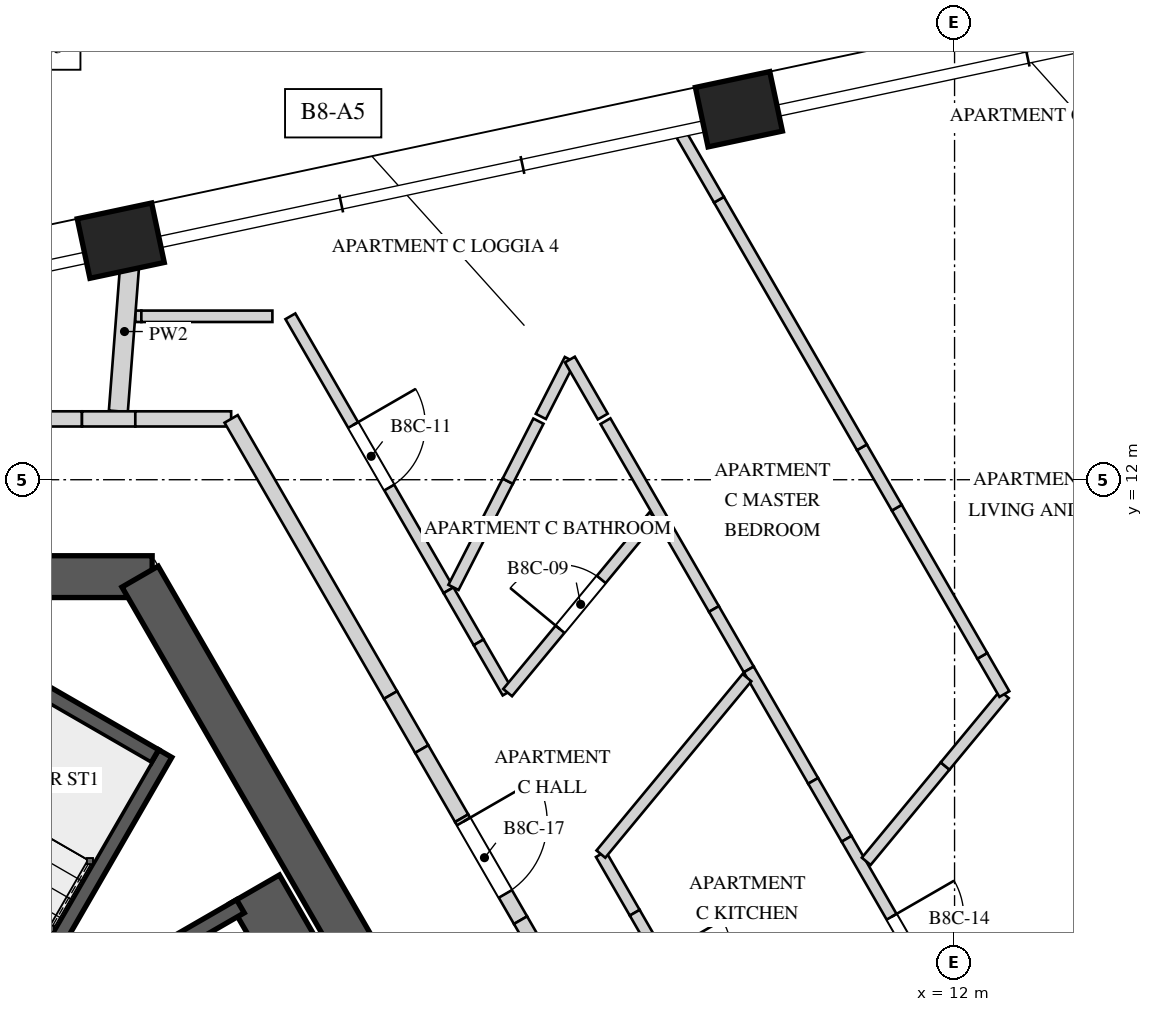
"""IFC4 building model, lengths in metres.
Left out: names, types, materials, properties, quantities, classifications, styles, units other than length and angle.
Written with IfcOpenShell. Run it as: python <this file> out.ifc"""

import sys

from ifc_helpers import new_model, si_unit, direction, frame, frame_2d, origin, origin_2d, place, context, subcontext, project, spatial, polyline, rectangle, outline, extrude, element, fill, save


model = new_model("IFC4")
c1 = context("Model", 3, precision=1e-05, world=origin(), true_north=direction((0.0, 1.0)))
c2 = subcontext(c1, "Body", "Model", "MODEL_VIEW")
j1 = project(units=[si_unit("LENGTHUNIT", "METRE"), si_unit("PLANEANGLEUNIT", "RADIAN")], contexts=[c1])
p1 = place(None, origin())
s1 = spatial("IfcSite", under=j1, at=p1, CompositionType="ELEMENT")
p2 = place(p1, origin())
s2 = spatial("IfcBuilding", under=s1, at=p2, CompositionType="ELEMENT")
p3 = place(p2, frame((0.0, 0.0, 348.4)))
s3 = spatial("IfcBuildingStorey", under=s2, at=p3, CompositionType="ELEMENT", Elevation=348.4)
p4 = place(p3, frame((1.443, 10.725, 0.0), z_axis=(0.0, 0.0, 1.0), x_axis=(-1.0, 0.0, 0.0)))
e1 = element("IfcWall", 1, at=p4, inside=s3, PredefinedType="SHEAR", context=c2, shape_type="SweptSolid", body=[
    extrude(rectangle(XDim=2.887, YDim=0.55, at=frame_2d((1.443, 0.0))), origin(), (0.0, 0.0, 1.0), 4.0),
])
p5 = place(p3, frame((9.93, -4.25, 0.0), z_axis=(0.0, 0.0, 1.0), x_axis=(-0.499994590896, 0.86602852671, 0.0)))
e2 = element("IfcWall", 2, at=p5, inside=s3, PredefinedType="SHEAR", context=c2, shape_type="SweptSolid", body=[
    extrude(rectangle(XDim=17.292, YDim=0.55, at=frame_2d((8.646, 0.0))), origin(), (0.0, 0.0, 1.0), 4.0),
])
p6 = place(p5, frame((6.921, 0.0, 0.0)))
e3 = element("IfcOpeningElement", 3, at=p6, cuts=e2, PredefinedType="OPENING", context=c2, shape_type="SweptSolid", body=[
    extrude(rectangle(XDim=1.0, YDim=2.4, at=frame_2d((0.5, 1.2))), frame((0.0, 0.285, 0.0), z_axis=(0.0, -1.0, 0.0), x_axis=(1.0, 0.0, 0.0)), (0.0, 0.0, 1.0), 0.57),
])
for number, where, z_axis, x_axis in (
    (4, (9.163, 16.874, 0.0), (0.0, 0.0, 1.0), (-0.978, -0.208, 0.0)),
    (5, (1.031, 15.145, 0.0), (0.0, 0.0, 1.0), (-0.978, -0.208, 0.0)),
):
    element("IfcColumn", number, at=place(p3, frame(where, z_axis=z_axis, x_axis=x_axis)), inside=s3, PredefinedType="COLUMN", context=c2, shape_type="SweptSolid", body=[
        extrude(rectangle(XDim=1.0, YDim=0.8, at=origin_2d()), origin(), (0.0, 0.0, 1.0), 4.0),
    ])
p7 = place(p3, frame((1.615, 8.397, 0.0), z_axis=(0.0, 0.0, 1.0), x_axis=(-0.500009909098, -0.866019682689, 0.0)))
e6 = element("IfcWall", 6, at=p7, inside=s3, PredefinedType="SOLIDWALL", context=c2, shape_type="SweptSolid", body=[
    extrude(rectangle(XDim=6.2, YDim=0.2, at=frame_2d((3.1, 0.0))), origin(), (0.0, 0.0, 1.0), 3.65),
])
p8 = place(p3, frame((1.479, 8.361, 0.0), z_axis=(0.0, 0.0, 1.0), x_axis=(-0.865989465428, 0.500062241894, 0.0)))
e7 = element("IfcWall", 7, at=p8, inside=s3, PredefinedType="SOLIDWALL", context=c2, shape_type="SweptSolid", body=[
    extrude(rectangle(XDim=2.55, YDim=0.2, at=frame_2d((1.275, 0.0))), origin(), (0.0, 0.0, 1.0), 3.65),
])
p9 = place(p3, frame((5.243, 2.369, 0.0), z_axis=(0.0, 0.0, 1.0), x_axis=(-0.500002801628, 0.866023786258, 0.0)))
e8 = element("IfcWall", 8, at=p9, inside=s3, PredefinedType="SOLIDWALL", context=c2, shape_type="SweptSolid", body=[
    extrude(rectangle(XDim=4.9, YDim=0.75, at=frame_2d((2.45, 0.0))), origin(), (0.0, 0.0, 1.0), 3.65),
])
p10 = place(p3, frame((-0.123, 4.813, 0.0), z_axis=(0.0, 0.0, 1.0), x_axis=(0.866016494683, 0.500015430699, 0.0)))
e9 = element("IfcWall", 9, at=p10, inside=s3, PredefinedType="SOLIDWALL", context=c2, shape_type="SweptSolid", body=[
    extrude(rectangle(XDim=3.15, YDim=0.2, at=frame_2d((1.575, 0.0))), origin(), (0.0, 0.0, 1.0), 3.65),
])
p11 = place(p3, frame((1.221, 14.15, 0.0), z_axis=(0.0, 0.0, 1.0), x_axis=(1.0, 0.0, 0.0)))
e10 = element("IfcWall", 10, at=p11, inside=s3, PredefinedType="PARTITIONING", context=c2, shape_type="SweptSolid", body=[
    extrude(rectangle(XDim=0.08, YDim=0.15, at=frame_2d((0.04, 0.0))), origin(), (0.0, 0.0, 1.0), 2.95),
])
p12 = place(p3, frame((1.301, 14.15, 0.0), z_axis=(0.0, 0.0, 1.0), x_axis=(1.0, 0.0, 0.0)))
e11 = element("IfcWall", 11, at=p12, inside=s3, PredefinedType="PARTITIONING", context=c2, shape_type="SweptSolid", body=[
    extrude(rectangle(XDim=1.724, YDim=0.15, at=frame_2d((0.862, 0.0))), origin(), (0.0, 0.0, 1.0), 3.65),
])
p13 = place(p3, frame((1.161, 14.999, 0.0), z_axis=(0.0, 0.0, 1.0), x_axis=(-0.077237463648, -0.997012725199, 0.0)))
e12 = element("IfcWall", 12, at=p13, inside=s3, PredefinedType="SOLIDWALL", context=c2, shape_type="SweptSolid", body=[
    extrude(rectangle(XDim=2.105, YDim=0.25, at=frame_2d((1.053, 0.0))), origin(), (0.0, 0.0, 1.0), 2.95),
])
p14 = place(p3, frame((3.262, 14.15, 0.0), z_axis=(0.0, 0.0, 1.0), x_axis=(0.500032238466, -0.866006790097, 0.0)))
e13 = element("IfcWall", 13, at=p14, inside=s3, PredefinedType="PARTITIONING", context=c2, shape_type="SweptSolid", body=[
    extrude(rectangle(XDim=4.161, YDim=0.15, at=frame_2d((2.081, 0.0))), origin(), (0.0, 0.0, 1.0), 3.65),
])
p15 = place(p14, frame((1.652, 0.0, 0.0)))
e14 = element("IfcOpeningElement", 14, at=p15, cuts=e13, PredefinedType="OPENING", context=c2, shape_type="SweptSolid", body=[
    extrude(rectangle(XDim=0.95, YDim=2.4, at=frame_2d((0.475, 1.2))), frame((0.0, 0.085, 0.0), z_axis=(0.0, -1.0, 0.0), x_axis=(1.0, 0.0, 0.0)), (0.0, 0.0, 1.0), 0.17),
])
p16 = place(p3, frame((5.343, 10.546, 0.0), z_axis=(0.0, 0.0, 1.0), x_axis=(0.499953838557, -0.866052053466, 0.0)))
e15 = element("IfcWall", 15, at=p16, inside=s3, PredefinedType="PARTITIONING", context=c2, shape_type="SweptSolid", body=[
    extrude(rectangle(XDim=0.792, YDim=0.15, at=frame_2d((0.396, 0.0))), origin(), (0.0, 0.0, 1.0), 2.95),
])
p17 = place(p3, frame((5.739, 9.861, 0.0), z_axis=(0.0, 0.0, 1.0), x_axis=(0.499888569412, -0.866089728707, 0.0)))
e16 = element("IfcWall", 16, at=p17, inside=s3, PredefinedType="PARTITIONING", context=c2, shape_type="SweptSolid", body=[
    extrude(rectangle(XDim=0.763, YDim=0.15, at=frame_2d((0.382, 0.0))), origin(), (0.0, 0.0, 1.0), 3.65),
])
p18 = place(p3, frame((5.408, 10.583, 0.0), z_axis=(0.0, 0.0, 1.0), x_axis=(0.455037050625, 0.890472505223, 0.0)))
e17 = element("IfcWall", 17, at=p18, inside=s3, PredefinedType="PARTITIONING", context=c2, shape_type="SweptSolid", body=[
    extrude(rectangle(XDim=1.569, YDim=0.15, at=frame_2d((0.785, 0.0))), origin(), (0.0, 0.0, 1.0), 2.95),
])
p19 = place(p3, frame((6.122, 11.981, 0.0), z_axis=(0.0, 0.0, 1.0), x_axis=(0.454907271536, 0.890538811228, 0.0)))
e18 = element("IfcWall", 18, at=p19, inside=s3, PredefinedType="PARTITIONING", context=c2, shape_type="SweptSolid", body=[
    extrude(rectangle(XDim=0.887, YDim=0.15, at=frame_2d((0.443, 0.0))), origin(), (0.0, 0.0, 1.0), 3.65),
])
p20 = place(p3, frame((6.12, 9.199, 0.0), z_axis=(0.0, 0.0, 1.0), x_axis=(0.63755942525, 0.770401180733, 0.0)))
e19 = element("IfcWall", 19, at=p20, inside=s3, PredefinedType="PARTITIONING", context=c2, shape_type="SweptSolid", body=[
    extrude(rectangle(XDim=3.014, YDim=0.15, at=frame_2d((1.507, 0.0))), origin(), (0.0, 0.0, 1.0), 3.65),
])
p21 = place(p20, frame((1.082, 0.0, 0.0)))
e20 = element("IfcOpeningElement", 20, at=p21, cuts=e19, PredefinedType="OPENING", context=c2, shape_type="SweptSolid", body=[
    extrude(rectangle(XDim=0.85, YDim=2.4, at=frame_2d((0.425, 1.2))), frame((0.0, 0.085, 0.0), z_axis=(0.0, -1.0, 0.0), x_axis=(1.0, 0.0, 0.0)), (0.0, 0.0, 1.0), 0.17),
])
p22 = place(p3, frame((6.557, 12.833, 0.0), z_axis=(0.0, 0.0, 1.0), x_axis=(0.454870350547, 0.890557670336, 0.0)))
e21 = element("IfcWall", 21, at=p22, inside=s3, PredefinedType="PARTITIONING", context=c2, shape_type="SweptSolid", body=[
    extrude(rectangle(XDim=0.84, YDim=0.15, at=frame_2d((0.42, 0.0))), origin(), (0.0, 0.0, 1.0), 3.65),
])
p23 = place(p3, frame((6.939, 13.581, 0.0), z_axis=(0.0, 0.0, 1.0), x_axis=(0.499990973765, -0.866030615021, 0.0)))
e22 = element("IfcWall", 22, at=p23, inside=s3, PredefinedType="PARTITIONING", context=c2, shape_type="SweptSolid", body=[
    extrude(rectangle(XDim=0.866, YDim=0.15, at=frame_2d((0.433, 0.0))), origin(), (0.0, 0.0, 1.0), 2.95),
])
p24 = place(p3, frame((7.347, 7.074, 0.0), z_axis=(0.0, 0.0, 1.0), x_axis=(0.499944022619, -0.866057719929, 0.0)))
e23 = element("IfcWall", 23, at=p24, inside=s3, PredefinedType="PARTITIONING", context=c2, shape_type="SweptSolid", body=[
    extrude(rectangle(XDim=0.89, YDim=0.15, at=frame_2d((0.445, 0.0))), origin(), (0.0, 0.0, 1.0), 3.65),
])
p25 = place(p3, frame((7.792, 6.303, 0.0), z_axis=(0.0, 0.0, 1.0), x_axis=(0.500027802648, -0.866009351323, 0.0)))
e24 = element("IfcWall", 24, at=p25, inside=s3, PredefinedType="PARTITIONING", context=c2, shape_type="SweptSolid", body=[
    extrude(outline(polyline([(0.0, 0.0), (1.661, 0.0), (1.661, 3.65), (0.881, 3.65), (0.881, 2.55), (0.0, 2.55), (0.0, 0.0)])), frame((0.0, 0.075, 0.0), z_axis=(0.0, -1.0, 0.0), x_axis=(1.0, 0.0, 0.0)), (0.0, 0.0, 1.0), 0.15),
])
p26 = place(p25, frame((0.661, 0.0, 0.0)))
e25 = element("IfcOpeningElement", 25, at=p26, cuts=e24, PredefinedType="OPENING", context=c2, shape_type="SweptSolid", body=[
    extrude(rectangle(XDim=0.95, YDim=2.4, at=frame_2d((0.475, 1.2))), frame((0.0, 0.085, 0.0), z_axis=(0.0, -1.0, 0.0), x_axis=(1.0, 0.0, 0.0)), (0.0, 0.0, 1.0), 0.17),
])
p27 = place(p3, frame((7.407, 12.771, 0.0), z_axis=(0.0, 0.0, 1.0), x_axis=(0.499966841219, -0.866044547169, 0.0)))
e26 = element("IfcWall", 26, at=p27, inside=s3, PredefinedType="PARTITIONING", context=c2, shape_type="SweptSolid", body=[
    extrude(rectangle(XDim=2.854, YDim=0.15, at=frame_2d((1.427, 0.0))), origin(), (0.0, 0.0, 1.0), 3.65),
])
p28 = place(p3, frame((8.834, 10.299, 0.0), z_axis=(0.0, 0.0, 1.0), x_axis=(0.499945096919, -0.866057099772, 0.0)))
e27 = element("IfcWall", 27, at=p28, inside=s3, PredefinedType="PARTITIONING", context=c2, shape_type="SweptSolid", body=[
    extrude(rectangle(XDim=0.917, YDim=0.15, at=frame_2d((0.459, 0.0))), origin(), (0.0, 0.0, 1.0), 2.55),
])
p29 = place(p3, frame((9.293, 9.504, 0.0), z_axis=(0.0, 0.0, 1.0), x_axis=(0.500046963369, -0.865998287773, 0.0)))
e28 = element("IfcWall", 28, at=p29, inside=s3, PredefinedType="PARTITIONING", context=c2, shape_type="SweptSolid", body=[
    extrude(rectangle(XDim=1.693, YDim=0.15, at=frame_2d((0.847, 0.0))), origin(), (0.0, 0.0, 1.0), 3.65),
])
p30 = place(p3, frame((10.139, 8.038, 0.0), z_axis=(0.0, 0.0, 1.0), x_axis=(0.499866452165, -0.866102493935, 0.0)))
e29 = element("IfcWall", 29, at=p30, inside=s3, PredefinedType="PARTITIONING", context=c2, shape_type="SweptSolid", body=[
    extrude(rectangle(XDim=0.881, YDim=0.15, at=frame_2d((0.44, 0.0))), origin(), (0.0, 0.0, 1.0), 2.55),
])
p31 = place(p3, frame((10.58, 7.275, 0.0), z_axis=(0.0, 0.0, 1.0), x_axis=(0.500012835235, -0.866017993231, 0.0)))
e30 = element("IfcWall", 30, at=p31, inside=s3, PredefinedType="PARTITIONING", context=c2, shape_type="SweptSolid", body=[
    extrude(rectangle(XDim=2.305, YDim=0.15, at=frame_2d((1.152, 0.0))), origin(), (0.0, 0.0, 1.0), 3.65),
])
p32 = place(p31, frame((1.184, 0.0, 0.0)))
e31 = element("IfcOpeningElement", 31, at=p32, cuts=e30, PredefinedType="OPENING", context=c2, shape_type="SweptSolid", body=[
    extrude(rectangle(XDim=0.95, YDim=2.4, at=frame_2d((0.475, 1.2))), frame((0.0, 0.085, 0.0), z_axis=(0.0, -1.0, 0.0), x_axis=(1.0, 0.0, 0.0)), (0.0, 0.0, 1.0), 0.17),
])
p33 = place(p3, frame((9.269, 9.396, 0.0), z_axis=(0.0, 0.0, 1.0), x_axis=(-0.637511345934, -0.770440967113, 0.0)))
e32 = element("IfcWall", 32, at=p33, inside=s3, PredefinedType="PARTITIONING", context=c2, shape_type="SweptSolid", body=[
    extrude(rectangle(XDim=3.014, YDim=0.15, at=frame_2d((1.507, 0.0))), origin(), (0.0, 0.0, 1.0), 3.65),
])
p34 = place(p3, frame((10.838, 6.98, 0.0), z_axis=(0.0, 0.0, 1.0), x_axis=(0.637509370169, 0.770442601981, 0.0)))
e33 = element("IfcWall", 33, at=p34, inside=s3, PredefinedType="PARTITIONING", context=c2, shape_type="SweptSolid", body=[
    extrude(rectangle(XDim=1.627, YDim=0.15, at=frame_2d((0.813, 0.0))), origin(), (0.0, 0.0, 1.0), 3.65),
])
p35 = place(p3, frame((11.875, 8.233, 0.0), z_axis=(0.0, 0.0, 1.0), x_axis=(0.637588147155, 0.770377410499, 0.0)))
e34 = element("IfcWall", 34, at=p35, inside=s3, PredefinedType="PARTITIONING", context=c2, shape_type="SweptSolid", body=[
    extrude(rectangle(XDim=1.223, YDim=0.15, at=frame_2d((0.611, 0.0))), origin(), (0.0, 0.0, 1.0), 2.55),
])
p36 = place(p3, frame((12.656, 9.18, 0.0), z_axis=(0.0, 0.0, 1.0), x_axis=(-0.500025556299, 0.866010648346, 0.0)))
e35 = element("IfcWall", 35, at=p36, inside=s3, PredefinedType="PARTITIONING", context=c2, shape_type="SweptSolid", body=[
    extrude(rectangle(XDim=0.581, YDim=0.15, at=frame_2d((0.291, 0.0))), origin(), (0.0, 0.0, 1.0), 2.55),
])
p37 = place(p3, frame((12.365, 9.683, 0.0), z_axis=(0.0, 0.0, 1.0), x_axis=(-0.499966648284, 0.866044658551, 0.0)))
e36 = element("IfcWall", 36, at=p37, inside=s3, PredefinedType="PARTITIONING", context=c2, shape_type="SweptSolid", body=[
    extrude(rectangle(XDim=2.25, YDim=0.15, at=frame_2d((1.125, 0.0))), origin(), (0.0, 0.0, 1.0), 3.65),
])
p38 = place(p3, frame((11.24, 11.632, 0.0), z_axis=(0.0, 0.0, 1.0), x_axis=(-0.499945096919, 0.866057099772, 0.0)))
e37 = element("IfcWall", 37, at=p38, inside=s3, PredefinedType="PARTITIONING", context=c2, shape_type="SweptSolid", body=[
    extrude(rectangle(XDim=0.917, YDim=0.15, at=frame_2d((0.459, 0.0))), origin(), (0.0, 0.0, 1.0), 2.55),
])
p39 = place(p3, frame((10.781, 12.427, 0.0), z_axis=(0.0, 0.0, 1.0), x_axis=(-0.499999645032, 0.866025608725, 0.0)))
e38 = element("IfcWall", 38, at=p39, inside=s3, PredefinedType="PARTITIONING", context=c2, shape_type="SweptSolid", body=[
    extrude(rectangle(XDim=3.761, YDim=0.15, at=frame_2d((1.881, 0.0))), origin(), (0.0, 0.0, 1.0), 3.65),
])
p40 = place(p3, frame((8.901, 15.684, 0.0), z_axis=(0.0, 0.0, 1.0), x_axis=(-0.500129239174, 0.865950774653, 0.0)))
e39 = element("IfcWall", 39, at=p40, inside=s3, PredefinedType="PARTITIONING", context=c2, shape_type="SweptSolid", body=[
    extrude(rectangle(XDim=0.987, YDim=0.15, at=frame_2d((0.494, 0.0))), origin(), (0.0, 0.0, 1.0), 2.95),
])
p41 = place(p3, frame((-2.483, 12.8, 0.0), z_axis=(0.0, 0.0, 1.0), x_axis=(1.0, 0.0, 0.0)))
e40 = element("IfcWall", 40, at=p41, inside=s3, PredefinedType="SOLIDWALL", context=c2, shape_type="SweptSolid", body=[
    extrude(rectangle(XDim=3.003, YDim=0.2, at=frame_2d((1.501, 0.0))), origin(), (0.0, 0.0, 1.0), 3.65),
])
p42 = place(p3, frame((0.52, 12.8, 0.0), z_axis=(0.0, 0.0, 1.0), x_axis=(1.0, 0.0, 0.0)))
e41 = element("IfcWall", 41, at=p42, inside=s3, PredefinedType="SOLIDWALL", context=c2, shape_type="SweptSolid", body=[
    extrude(rectangle(XDim=0.701, YDim=0.2, at=frame_2d((0.351, 0.0))), origin(), (0.0, 0.0, 1.0), 2.95),
])
p43 = place(p3, frame((1.222, 12.8, 0.0), z_axis=(0.0, 0.0, 1.0), x_axis=(1.0, 0.0, 0.0)))
e42 = element("IfcWall", 42, at=p43, inside=s3, PredefinedType="SOLIDWALL", context=c2, shape_type="SweptSolid", body=[
    extrude(rectangle(XDim=1.261, YDim=0.2, at=frame_2d((0.63, 0.0))), origin(), (0.0, 0.0, 1.0), 3.65),
])
p44 = place(p3, frame((2.483, 12.8, 0.0), z_axis=(0.0, 0.0, 1.0), x_axis=(0.499982771656, -0.866035350345, 0.0)))
e43 = element("IfcWall", 43, at=p44, inside=s3, PredefinedType="SOLIDWALL", context=c2, shape_type="SweptSolid", body=[
    extrude(rectangle(XDim=4.195, YDim=0.2, at=frame_2d((2.097, 0.0))), origin(), (0.0, 0.0, 1.0), 3.65),
])
p45 = place(p3, frame((4.58, 9.167, 0.0), z_axis=(0.0, 0.0, 1.0), x_axis=(0.499945576647, -0.866056822842, 0.0)))
e44 = element("IfcWall", 44, at=p45, inside=s3, PredefinedType="SOLIDWALL", context=c2, shape_type="SweptSolid", body=[
    extrude(rectangle(XDim=0.821, YDim=0.2, at=frame_2d((0.41, 0.0))), origin(), (0.0, 0.0, 1.0), 2.95),
])
p46 = place(p3, frame((4.99, 8.457, 0.0), z_axis=(0.0, 0.0, 1.0), x_axis=(0.500064554934, -0.865988129768, 0.0)))
e45 = element("IfcWall", 45, at=p46, inside=s3, PredefinedType="SOLIDWALL", context=c2, shape_type="SweptSolid", body=[
    extrude(rectangle(XDim=1.05, YDim=0.2, at=frame_2d((0.525, 0.0))), origin(), (0.0, 0.0, 1.0), 3.65),
])
p47 = place(p3, frame((5.515, 7.547, 0.0), z_axis=(0.0, 0.0, 1.0), x_axis=(0.499986163319, -0.866033392248, 0.0)))
e46 = element("IfcWall", 46, at=p47, inside=s3, PredefinedType="SOLIDWALL", context=c2, shape_type="SweptSolid", body=[
    extrude(outline(polyline([(0.0, 0.0), (1.549, 0.0), (1.549, 2.55), (0.605, 2.55), (0.605, 3.65), (0.0, 3.65), (0.0, 0.0)])), frame((0.0, 0.1, 0.0), z_axis=(0.0, -1.0, 0.0), x_axis=(1.0, 0.0, 0.0)), (0.0, 0.0, 1.0), 0.2),
])
p48 = place(p47, frame((0.05, 0.0, 0.0)))
e47 = element("IfcOpeningElement", 47, at=p48, cuts=e46, PredefinedType="OPENING", context=c2, shape_type="SweptSolid", body=[
    extrude(rectangle(XDim=1.1, YDim=2.4, at=frame_2d((0.55, 1.2))), frame((0.0, 0.11, 0.0), z_axis=(0.0, -1.0, 0.0), x_axis=(1.0, 0.0, 0.0)), (0.0, 0.0, 1.0), 0.22),
])
p49 = place(p3, frame((6.29, 6.205, 0.0), z_axis=(0.0, 0.0, 1.0), x_axis=(0.500045602705, -0.86599907345, 0.0)))
e48 = element("IfcWall", 48, at=p49, inside=s3, PredefinedType="SOLIDWALL", context=c2, shape_type="SweptSolid", body=[
    extrude(rectangle(XDim=0.807, YDim=0.2, at=frame_2d((0.403, 0.0))), origin(), (0.0, 0.0, 1.0), 3.65),
])
p50 = place(p21, origin())
e49 = element("IfcDoor", 49, at=p50, inside=s3, OperationType="SINGLE_SWING_LEFT", PredefinedType="DOOR", context=c2, shape_type="SweptSolid", body=[
    extrude(rectangle(XDim=0.85, YDim=2.4, at=frame_2d((0.425, 1.2))), frame((0.0, 0.025, 0.0), z_axis=(0.0, -1.0, 0.0), x_axis=(1.0, 0.0, 0.0)), (0.0, 0.0, 1.0), 0.05),
])
fill(e20, e49)
p51 = place(p15, origin())
e50 = element("IfcDoor", 50, at=p51, inside=s3, OperationType="SINGLE_SWING_LEFT", PredefinedType="DOOR", context=c2, shape_type="SweptSolid", body=[
    extrude(rectangle(XDim=0.95, YDim=2.4, at=frame_2d((0.475, 1.2))), frame((0.0, 0.025, 0.0), z_axis=(0.0, -1.0, 0.0), x_axis=(1.0, 0.0, 0.0)), (0.0, 0.0, 1.0), 0.05),
])
fill(e14, e50)
p52 = place(p32, origin())
e51 = element("IfcDoor", 51, at=p52, inside=s3, OperationType="SINGLE_SWING_RIGHT", PredefinedType="DOOR", context=c2, shape_type="SweptSolid", body=[
    extrude(rectangle(XDim=0.95, YDim=2.4, at=frame_2d((0.475, 1.2))), frame((0.0, 0.025, 0.0), z_axis=(0.0, -1.0, 0.0), x_axis=(1.0, 0.0, 0.0)), (0.0, 0.0, 1.0), 0.05),
])
fill(e31, e51)
p53 = place(p48, origin())
e52 = element("IfcDoor", 52, at=p53, inside=s3, OperationType="SINGLE_SWING_LEFT", PredefinedType="DOOR", context=c2, shape_type="SweptSolid", body=[
    extrude(rectangle(XDim=1.1, YDim=2.4, at=frame_2d((0.55, 1.2))), frame((0.0, 0.025, 0.0), z_axis=(0.0, -1.0, 0.0), x_axis=(1.0, 0.0, 0.0)), (0.0, 0.0, 1.0), 0.05),
])
fill(e47, e52)
save(model, sys.argv[1])
